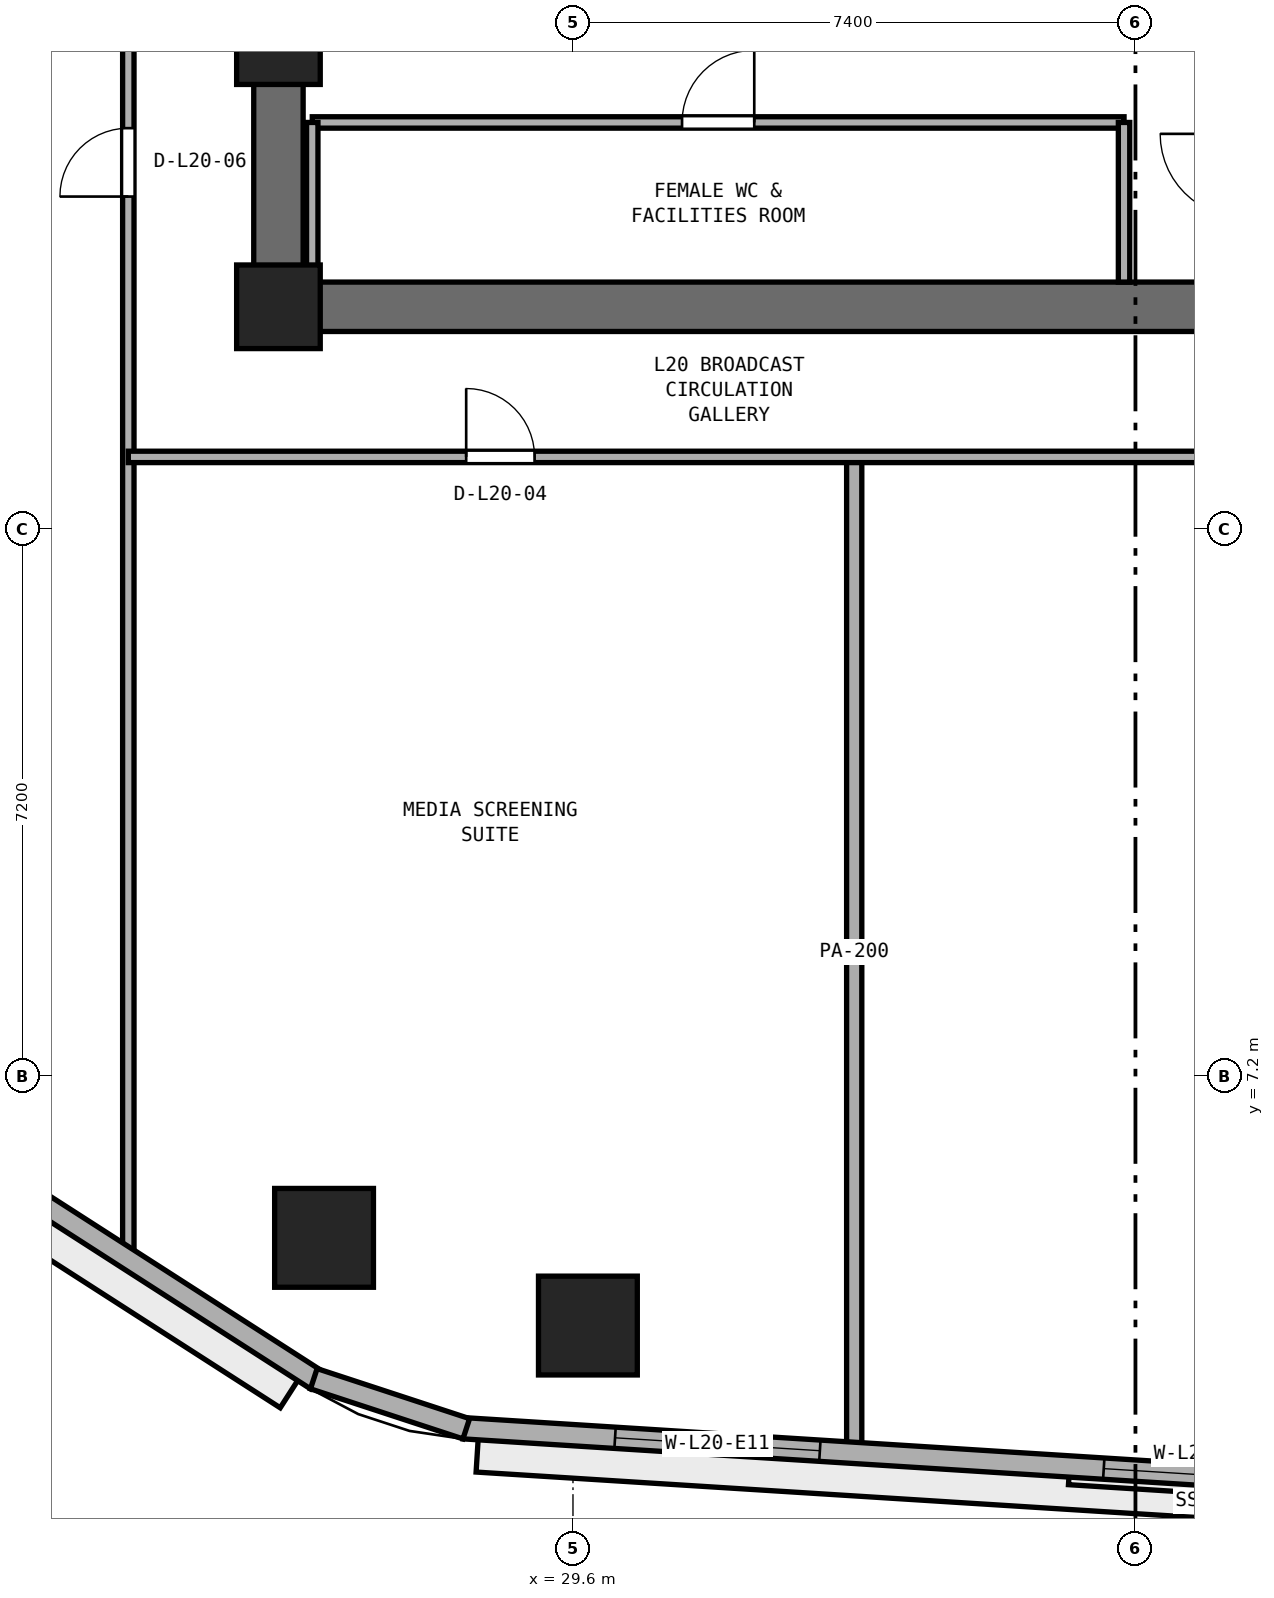
"""IFC4 building model, lengths in metres.
Left out: names, types, materials, properties, quantities, classifications, styles, units other than length and angle.
Written with IfcOpenShell. Run it as: python <this file> out.ifc"""

import sys

from ifc_helpers import new_model, si_unit, direction, frame, frame_2d, origin, origin_2d, place, context, subcontext, project, spatial, rectangle, extrude, element, fill, save


model = new_model("IFC4")
c1 = context("Model", 3, precision=1e-05, world=origin(), true_north=direction((0.0, 1.0)))
c2 = subcontext(c1, "Body", "Model", "MODEL_VIEW")
j1 = project(units=[si_unit("LENGTHUNIT", "METRE"), si_unit("PLANEANGLEUNIT", "RADIAN")], contexts=[c1])
p1 = place(None, origin())
s1 = spatial("IfcSite", under=j1, at=p1, CompositionType="ELEMENT")
p2 = place(p1, origin())
s2 = spatial("IfcBuilding", under=s1, at=p2, CompositionType="ELEMENT")
p3 = place(p2, frame((0.0, 0.0, 82.0)))
s3 = spatial("IfcBuildingStorey", under=s2, at=p3, CompositionType="ELEMENT", Elevation=82.0)
p4 = place(p3, frame((25.4, 17.325, 0.0), z_axis=(0.0, 0.0, 1.0), x_axis=(1.0, 0.0, 0.0)))
e1 = element("IfcWall", 1, at=p4, inside=s3, PredefinedType="SHEAR", context=c2, shape_type="SweptSolid", body=[
    extrude(rectangle(XDim=23.2, YDim=0.65, at=frame_2d((11.6, 0.0))), origin(), (0.0, 0.0, 1.0), 3.525),
])
p5 = place(p3, frame((25.725, 17.65, 0.0), z_axis=(0.0, 0.0, 1.0), x_axis=(0.0, 1.0, 0.0)))
e2 = element("IfcWall", 2, at=p5, inside=s3, PredefinedType="SHEAR", context=c2, shape_type="SweptSolid", body=[
    extrude(rectangle(XDim=15.1, YDim=0.65, at=frame_2d((7.55, 0.0))), origin(), (0.0, 0.0, 1.0), 3.525),
])
p6 = place(p5, frame((6.8, 0.0, 0.0)))
e3 = element("IfcOpeningElement", 3, at=p6, cuts=e2, PredefinedType="OPENING", context=c2, shape_type="SweptSolid", body=[
    extrude(rectangle(XDim=1.5, YDim=2.15, at=frame_2d((0.75, 1.075))), frame((0.0, 0.335, 0.0), z_axis=(0.0, -1.0, 0.0), x_axis=(1.0, 0.0, 0.0)), (0.0, 0.0, 1.0), 0.67),
])
for number, where, z_axis, x_axis in (
    (4, (25.725, 17.325, 0.0), (0.0, 0.0, 1.0), (1.0, 0.0, 0.0)),
    (5, (25.725, 20.8, 0.0), (0.0, 0.0, 1.0), (1.0, 0.0, 0.0)),
):
    element("IfcColumn", number, at=place(p3, frame(where, z_axis=z_axis, x_axis=x_axis)), inside=s3, PredefinedType="PILASTER", context=c2, shape_type="SweptSolid", body=[
        extrude(rectangle(XDim=1.1, YDim=1.1, at=origin_2d()), origin(), (0.0, 0.0, 1.0), 3.8),
    ])
for number, where, z_axis, x_axis in (
    (6, (29.796, 3.922, 0.0), (0.0, 0.0, 1.0), (1.0, 0.0, 0.0)),
    (7, (26.325, 5.076, 0.0), (0.0, 0.0, 1.0), (1.0, 0.0, 0.0)),
):
    element("IfcColumn", number, at=place(p3, frame(where, z_axis=z_axis, x_axis=x_axis)), inside=s3, PredefinedType="COLUMN", context=c2, shape_type="SweptSolid", body=[
        extrude(rectangle(XDim=1.3, YDim=1.3, at=origin_2d()), origin(), (0.0, 0.0, 1.0), 3.8),
    ])
p7 = place(p3, frame((26.17, 19.75, 0.0), z_axis=(0.0, 0.0, 1.0), x_axis=(1.0, 0.0, 0.0)))
e8 = element("IfcWall", 8, at=p7, inside=s3, PredefinedType="PARTITIONING", context=c2, shape_type="SweptSolid", body=[
    extrude(rectangle(XDim=10.68, YDim=0.15, at=frame_2d((5.34, 0.0))), origin(), (0.0, 0.0, 1.0), 3.525),
])
p8 = place(p7, frame((4.865, 0.0, 0.0)))
e9 = element("IfcOpeningElement", 9, at=p8, cuts=e8, PredefinedType="OPENING", context=c2, shape_type="SweptSolid", body=[
    extrude(rectangle(XDim=0.95, YDim=2.1, at=frame_2d((0.475, 1.05))), frame((0.0, 0.085, 0.0), z_axis=(0.0, -1.0, 0.0), x_axis=(1.0, 0.0, 0.0)), (0.0, 0.0, 1.0), 0.17),
])
for number, where, z_axis, x_axis in (
    (10, (26.17, 17.65, 0.0), (0.0, 0.0, 1.0), (0.0, 1.0, 0.0)),
    (11, (36.85, 17.65, 0.0), (0.0, 0.0, 1.0), (0.0, 1.0, 0.0)),
):
    element("IfcWall", number, at=place(p3, frame(where, z_axis=z_axis, x_axis=x_axis)), inside=s3, PredefinedType="PARTITIONING", context=c2, shape_type="SweptSolid", body=[
        extrude(rectangle(XDim=2.1, YDim=0.15, at=frame_2d((1.05, 0.0))), origin(), (0.0, 0.0, 1.0), 3.525),
    ])
p9 = place(p3, frame((33.3, 2.312, 0.0), z_axis=(0.0, 0.0, 1.0), x_axis=(0.0, 1.0, 0.0)))
e12 = element("IfcWall", 12, at=p9, inside=s3, PredefinedType="PARTITIONING", context=c2, shape_type="SweptSolid", body=[
    extrude(rectangle(XDim=13.038, YDim=0.2, at=frame_2d((6.519, 0.0))), origin(), (0.0, 0.0, 1.0), 3.525),
])
p10 = place(p3, frame((23.75, 4.769, 0.0), z_axis=(0.0, 0.0, 1.0), x_axis=(0.0, 1.0, 0.0)))
e13 = element("IfcWall", 13, at=p10, inside=s3, PredefinedType="PARTITIONING", context=c2, shape_type="SweptSolid", body=[
    extrude(rectangle(XDim=40.691, YDim=0.15, at=frame_2d((20.345, 0.0))), origin(), (0.0, 0.0, 1.0), 3.525),
])
p11 = place(p10, frame((14.006, 0.0, 0.0)))
e14 = element("IfcOpeningElement", 14, at=p11, cuts=e13, PredefinedType="OPENING", context=c2, shape_type="SweptSolid", body=[
    extrude(rectangle(XDim=0.9, YDim=2.1, at=frame_2d((0.45, 1.05))), frame((0.0, 0.085, 0.0), z_axis=(0.0, -1.0, 0.0), x_axis=(1.0, 0.0, 0.0)), (0.0, 0.0, 1.0), 0.17),
])
p12 = place(p10, frame((21.181, 0.0, 0.0)))
e15 = element("IfcOpeningElement", 15, at=p12, cuts=e13, PredefinedType="OPENING", context=c2, shape_type="SweptSolid", body=[
    extrude(rectangle(XDim=0.9, YDim=2.1, at=frame_2d((0.45, 1.05))), frame((0.0, 0.085, 0.0), z_axis=(0.0, -1.0, 0.0), x_axis=(1.0, 0.0, 0.0)), (0.0, 0.0, 1.0), 0.17),
])
p13 = place(p10, frame((27.156, 0.0, 0.0)))
e16 = element("IfcOpeningElement", 16, at=p13, cuts=e13, PredefinedType="OPENING", context=c2, shape_type="SweptSolid", body=[
    extrude(rectangle(XDim=0.9, YDim=2.1, at=frame_2d((0.45, 1.05))), frame((0.0, 0.085, 0.0), z_axis=(0.0, -1.0, 0.0), x_axis=(1.0, 0.0, 0.0)), (0.0, 0.0, 1.0), 0.17),
])
p14 = place(p3, frame((23.75, 15.35, 0.0), z_axis=(0.0, 0.0, 1.0), x_axis=(1.0, 0.0, 0.0)))
e17 = element("IfcWall", 17, at=p14, inside=s3, PredefinedType="PARTITIONING", context=c2, shape_type="SweptSolid", body=[
    extrude(rectangle(XDim=26.5, YDim=0.15, at=frame_2d((13.25, 0.0))), origin(), (0.0, 0.0, 1.0), 3.525),
])
p15 = place(p14, frame((4.445, 0.0, 0.0)))
e18 = element("IfcOpeningElement", 18, at=p15, cuts=e17, PredefinedType="OPENING", context=c2, shape_type="SweptSolid", body=[
    extrude(rectangle(XDim=0.9, YDim=2.1, at=frame_2d((0.45, 1.05))), frame((0.0, 0.085, 0.0), z_axis=(0.0, -1.0, 0.0), x_axis=(1.0, 0.0, 0.0)), (0.0, 0.0, 1.0), 0.17),
])
p16 = place(p14, frame((17.455, 0.0, 0.0)))
e19 = element("IfcOpeningElement", 19, at=p16, cuts=e17, PredefinedType="OPENING", context=c2, shape_type="SweptSolid", body=[
    extrude(rectangle(XDim=0.9, YDim=2.1, at=frame_2d((0.45, 1.05))), frame((0.0, 0.085, 0.0), z_axis=(0.0, -1.0, 0.0), x_axis=(1.0, 0.0, 0.0)), (0.0, 0.0, 1.0), 0.17),
])
p17 = place(p3, frame((28.161, 2.571, 0.0), z_axis=(0.0, 0.0, 1.0), x_axis=(0.998017288298, -0.06294038654, 0.0)))
e20 = element("IfcWall", 20, at=p17, inside=s3, PredefinedType="STANDARD", context=c2, shape_type="SweptSolid", body=[
    extrude(rectangle(XDim=19.577, YDim=0.28, at=frame_2d((9.789, 0.0))), origin(), (0.0, 0.0, 1.0), 3.525),
])
p18 = place(p17, frame((1.996, 0.0, 0.9)))
e21 = element("IfcOpeningElement", 21, at=p18, cuts=e20, PredefinedType="OPENING", context=c2, shape_type="SweptSolid", body=[
    extrude(rectangle(XDim=2.7, YDim=1.75, at=frame_2d((1.35, 0.875))), frame((0.0, 0.15, 0.0), z_axis=(0.0, -1.0, 0.0), x_axis=(1.0, 0.0, 0.0)), (0.0, 0.0, 1.0), 0.3),
])
p19 = place(p17, frame((8.438, 0.0, 0.9)))
e22 = element("IfcOpeningElement", 22, at=p19, cuts=e20, PredefinedType="OPENING", context=c2, shape_type="SweptSolid", body=[
    extrude(rectangle(XDim=2.7, YDim=1.75, at=frame_2d((1.35, 0.875))), frame((0.0, 0.15, 0.0), z_axis=(0.0, -1.0, 0.0), x_axis=(1.0, 0.0, 0.0)), (0.0, 0.0, 1.0), 0.3),
])
p20 = place(p17, frame((14.631, 0.0, 0.9)))
e23 = element("IfcOpeningElement", 23, at=p20, cuts=e20, PredefinedType="OPENING", context=c2, shape_type="SweptSolid", body=[
    extrude(rectangle(XDim=2.7, YDim=1.75, at=frame_2d((1.35, 0.875))), frame((0.0, 0.15, 0.0), z_axis=(0.0, -1.0, 0.0), x_axis=(1.0, 0.0, 0.0)), (0.0, 0.0, 1.0), 0.3),
])
p21 = place(p3, frame((11.405, 12.728, 0.0), z_axis=(0.0, 0.0, 1.0), x_axis=(0.841304564637, -0.540561402175, 0.0)))
e24 = element("IfcWall", 24, at=p21, inside=s3, PredefinedType="STANDARD", context=c2, shape_type="SweptSolid", body=[
    extrude(rectangle(XDim=17.612, YDim=0.28, at=frame_2d((8.806, 0.0))), origin(), (0.0, 0.0, 1.0), 3.525),
])
p22 = place(p21, frame((1.919, 0.0, 0.9)))
e25 = element("IfcOpeningElement", 25, at=p22, cuts=e24, PredefinedType="OPENING", context=c2, shape_type="SweptSolid", body=[
    extrude(rectangle(XDim=2.7, YDim=1.75, at=frame_2d((1.35, 0.875))), frame((0.0, 0.15, 0.0), z_axis=(0.0, -1.0, 0.0), x_axis=(1.0, 0.0, 0.0)), (0.0, 0.0, 1.0), 0.3),
])
p23 = place(p21, frame((7.456, 0.0, 0.9)))
e26 = element("IfcOpeningElement", 26, at=p23, cuts=e24, PredefinedType="OPENING", context=c2, shape_type="SweptSolid", body=[
    extrude(rectangle(XDim=2.7, YDim=1.75, at=frame_2d((1.35, 0.875))), frame((0.0, 0.15, 0.0), z_axis=(0.0, -1.0, 0.0), x_axis=(1.0, 0.0, 0.0)), (0.0, 0.0, 1.0), 0.3),
])
p24 = place(p3, frame((26.19, 3.223, 0.0), z_axis=(0.0, 0.0, 1.0), x_axis=(0.95016442175, -0.311749212734, 0.0)))
e27 = element("IfcWall", 27, at=p24, inside=s3, PredefinedType="STANDARD", context=c2, shape_type="SweptSolid", body=[
    extrude(rectangle(XDim=2.111, YDim=0.28, at=frame_2d((1.056, 0.0))), origin(), (0.0, 0.0, 1.0), 3.525),
])
p25 = place(p8, origin())
e28 = element("IfcDoor", 28, at=p25, inside=s3, OperationType="SINGLE_SWING_RIGHT", PredefinedType="DOOR", context=c2, shape_type="SweptSolid", body=[
    extrude(rectangle(XDim=0.95, YDim=2.1, at=frame_2d((0.475, 1.05))), frame((0.0, 0.025, 0.0), z_axis=(0.0, -1.0, 0.0), x_axis=(1.0, 0.0, 0.0)), (0.0, 0.0, 1.0), 0.05),
])
fill(e9, e28)
p26 = place(p15, origin())
e29 = element("IfcDoor", 29, at=p26, inside=s3, OperationType="SINGLE_SWING_LEFT", PredefinedType="DOOR", context=c2, shape_type="SweptSolid", body=[
    extrude(rectangle(XDim=0.9, YDim=2.1, at=frame_2d((0.45, 1.05))), frame((0.0, 0.025, 0.0), z_axis=(0.0, -1.0, 0.0), x_axis=(1.0, 0.0, 0.0)), (0.0, 0.0, 1.0), 0.05),
])
fill(e18, e29)
p27 = place(p11, origin())
e30 = element("IfcDoor", 30, at=p27, inside=s3, OperationType="SINGLE_SWING_LEFT", PredefinedType="DOOR", context=c2, shape_type="SweptSolid", body=[
    extrude(rectangle(XDim=0.9, YDim=2.1, at=frame_2d((0.45, 1.05))), frame((0.0, 0.025, 0.0), z_axis=(0.0, -1.0, 0.0), x_axis=(1.0, 0.0, 0.0)), (0.0, 0.0, 1.0), 0.05),
])
fill(e14, e30)
p28 = place(p18, origin())
e31 = element("IfcWindow", 31, at=p28, inside=s3, PartitioningType="SINGLE_PANEL", PredefinedType="WINDOW", context=c2, shape_type="SweptSolid", body=[
    extrude(rectangle(XDim=2.7, YDim=1.75, at=frame_2d((1.35, 0.875))), frame((0.0, 0.03, 0.0), z_axis=(0.0, -1.0, 0.0), x_axis=(1.0, 0.0, 0.0)), (0.0, 0.0, 1.0), 0.06),
])
fill(e21, e31)
p29 = place(p19, origin())
e32 = element("IfcWindow", 32, at=p29, inside=s3, PartitioningType="SINGLE_PANEL", PredefinedType="WINDOW", context=c2, shape_type="SweptSolid", body=[
    extrude(rectangle(XDim=2.7, YDim=1.75, at=frame_2d((1.35, 0.875))), frame((0.0, 0.03, 0.0), z_axis=(0.0, -1.0, 0.0), x_axis=(1.0, 0.0, 0.0)), (0.0, 0.0, 1.0), 0.06),
])
fill(e22, e32)
save(model, sys.argv[1])
